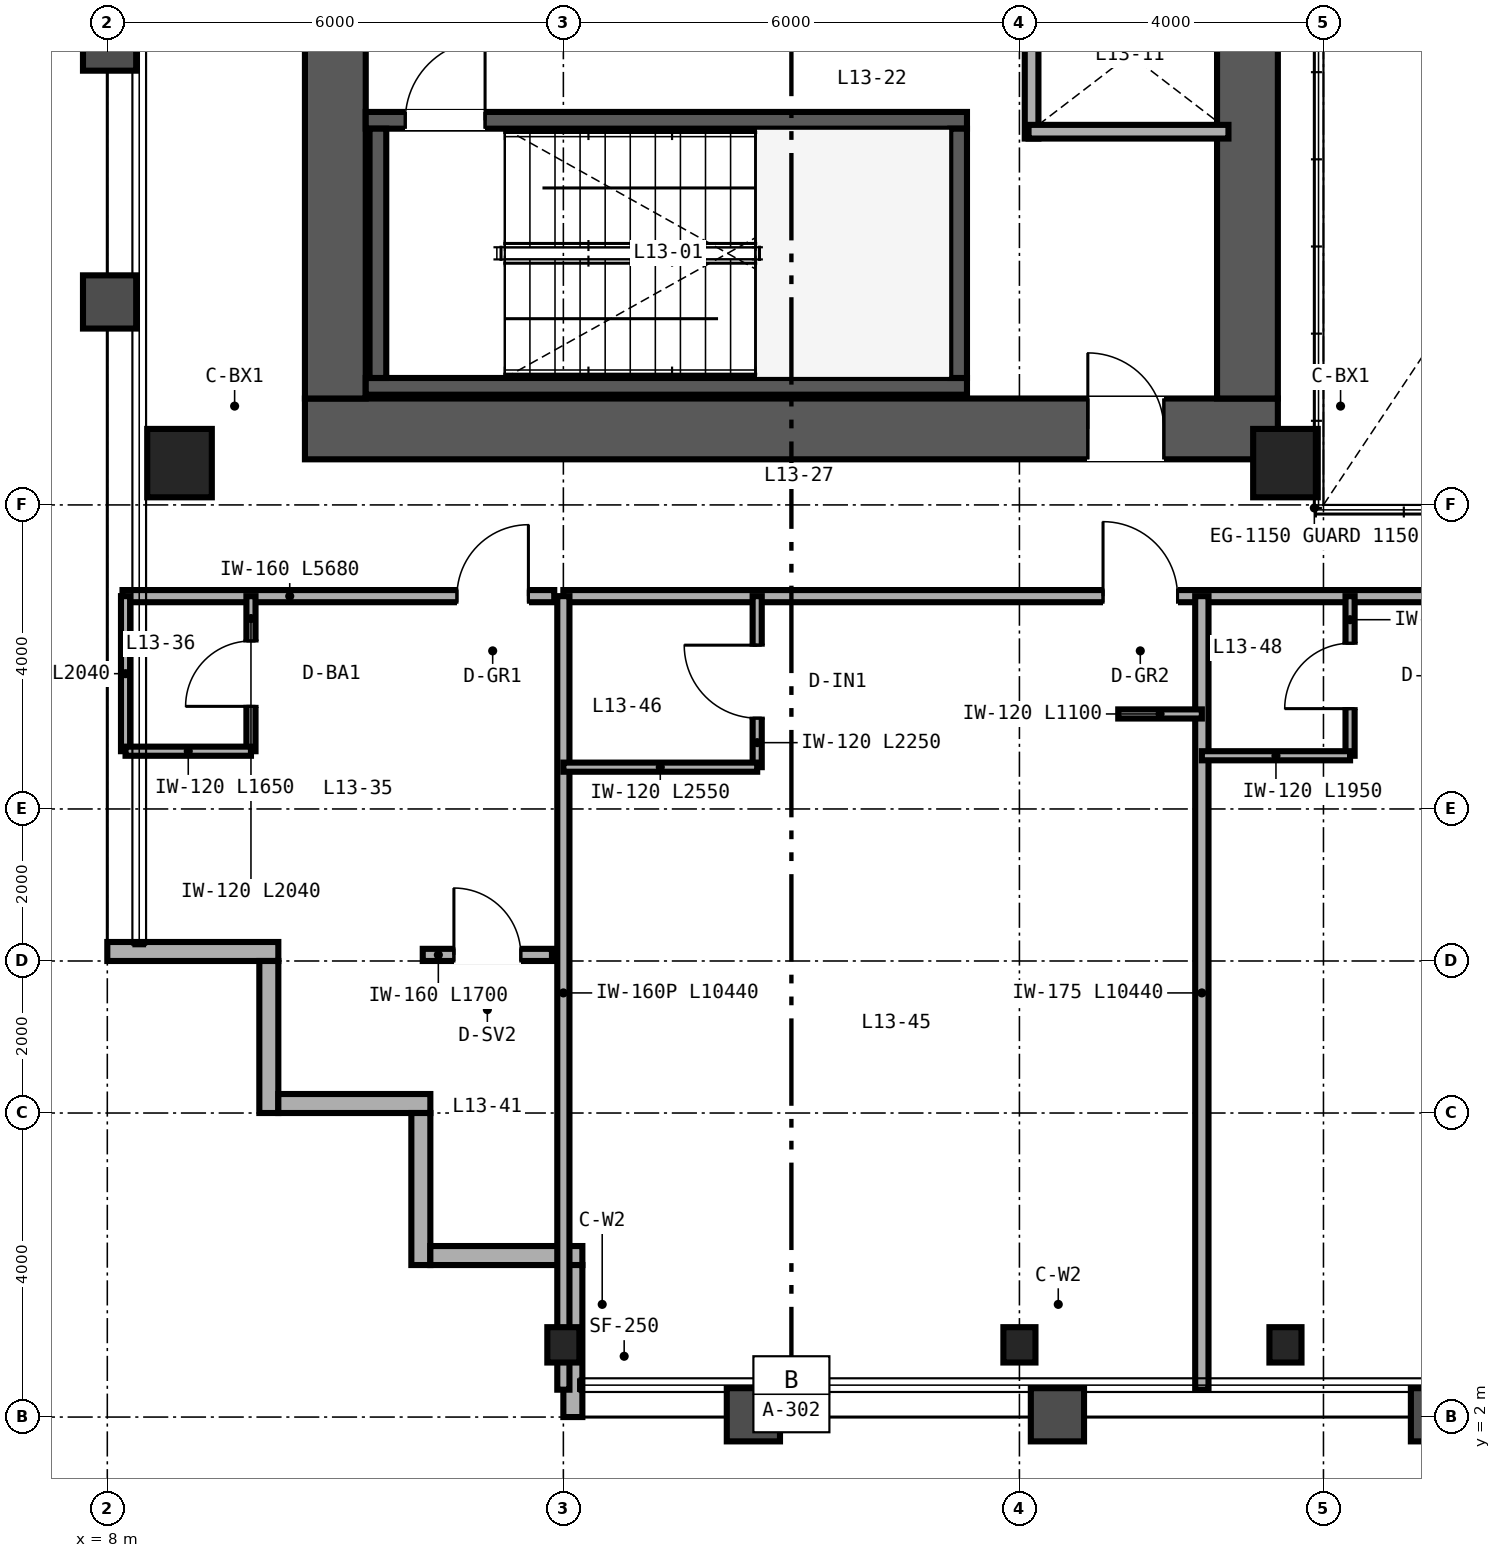
"""IFC4 building model, lengths in metres.
Left out: names, types, materials, properties, quantities, classifications, styles, units other than length and angle.
Written with IfcOpenShell. Run it as: python <this file> out.ifc"""

import sys

from ifc_helpers import new_model, si_unit, direction, frame, frame_2d, origin, origin_2d, place, context, subcontext, project, spatial, rectangle, hollow_rectangle, i_section, extrude, source, transform, mapped, element, fill, save


model = new_model("IFC4")
c1 = context("Model", 3, precision=1e-05, world=origin(), true_north=direction((0.0, 1.0)))
c2 = subcontext(c1, "Body", "Model", "MODEL_VIEW")
j1 = project(units=[si_unit("LENGTHUNIT", "METRE"), si_unit("PLANEANGLEUNIT", "RADIAN")], contexts=[c1])
p1 = place(None, origin())
s1 = spatial("IfcSite", under=j1, at=p1, CompositionType="ELEMENT")
p2 = place(p1, origin())
s2 = spatial("IfcBuilding", under=s1, at=p2, CompositionType="ELEMENT")
p3 = place(p2, frame((0.0, 0.0, 56.4)))
s3 = spatial("IfcBuildingStorey", under=s2, at=p3, CompositionType="ELEMENT", Elevation=56.4)
p4 = place(p3, frame((10.6, 15.0, 0.0), z_axis=(0.0, 0.0, 1.0), x_axis=(1.0, 0.0, 0.0)))
e1 = element("IfcWall", 1, at=p4, inside=s3, PredefinedType="SHEAR", context=c2, shape_type="SweptSolid", body=[
    extrude(rectangle(XDim=12.8, YDim=0.8, at=frame_2d((6.4, 0.0))), origin(), (0.0, 0.0, 1.0), 3.35),
])
p5 = place(p4, frame((10.3, 0.0, 0.0)))
e2 = element("IfcOpeningElement", 2, at=p5, cuts=e1, PredefinedType="OPENING", context=c2, shape_type="SweptSolid", body=[
    extrude(rectangle(XDim=1.0, YDim=2.15, at=frame_2d((0.5, 1.075))), frame((0.0, 0.41, 0.0), z_axis=(0.0, -1.0, 0.0), x_axis=(1.0, 0.0, 0.0)), (0.0, 0.0, 1.0), 0.82),
])
for number, where, z_axis, x_axis in (
    (3, (11.0, 15.4, 0.0), (0.0, 0.0, 1.0), (0.0, 1.0, 0.0)),
    (4, (23.0, 15.4, 0.0), (0.0, 0.0, 1.0), (0.0, 1.0, 0.0)),
):
    element("IfcWall", number, at=place(p3, frame(where, z_axis=z_axis, x_axis=x_axis)), inside=s3, PredefinedType="SHEAR", context=c2, shape_type="SweptSolid", body=[
        extrude(rectangle(XDim=21.2, YDim=0.8, at=frame_2d((10.6, 0.0))), origin(), (0.0, 0.0, 1.0), 3.35),
    ])
p6 = place(p3, frame((11.4, 15.56, 0.0), z_axis=(0.0, 0.0, 1.0), x_axis=(1.0, 0.0, 0.0)))
e5 = element("IfcWall", 5, at=p6, inside=s3, PredefinedType="SHEAR", context=c2, shape_type="SweptSolid", body=[
    extrude(rectangle(XDim=7.91, YDim=0.22, at=frame_2d((3.955, 0.0))), origin(), (0.0, 0.0, 1.0), 3.4),
])
p7 = place(p3, frame((11.4, 19.06, 0.0), z_axis=(0.0, 0.0, 1.0), x_axis=(1.0, 0.0, 0.0)))
e6 = element("IfcWall", 6, at=p7, inside=s3, PredefinedType="SHEAR", context=c2, shape_type="SweptSolid", body=[
    extrude(rectangle(XDim=7.91, YDim=0.22, at=frame_2d((3.955, 0.0))), origin(), (0.0, 0.0, 1.0), 3.4),
])
p8 = place(p7, frame((0.52, 0.0, 0.0)))
e7 = element("IfcOpeningElement", 7, at=p8, cuts=e6, PredefinedType="OPENING", context=c2, shape_type="SweptSolid", body=[
    extrude(rectangle(XDim=1.05, YDim=2.15, at=frame_2d((0.525, 1.075))), frame((0.0, 0.12, 0.0), z_axis=(0.0, -1.0, 0.0), x_axis=(1.0, 0.0, 0.0)), (0.0, 0.0, 1.0), 0.24),
])
for number, where, z_axis, x_axis in (
    (8, (11.56, 15.67, 0.0), (0.0, 0.0, 1.0), (0.0, 1.0, 0.0)),
    (9, (19.2, 15.67, 0.0), (0.0, 0.0, 1.0), (0.0, 1.0, 0.0)),
):
    element("IfcWall", number, at=place(p3, frame(where, z_axis=z_axis, x_axis=x_axis)), inside=s3, PredefinedType="SHEAR", context=c2, shape_type="SweptSolid", body=[
        extrude(rectangle(XDim=3.28, YDim=0.22, at=frame_2d((1.64, 0.0))), origin(), (0.0, 0.0, 1.0), 3.4),
    ])
m1 = source(origin(), c2, "Body", "SweptSolid", [
    extrude(hollow_rectangle(XDim=0.85, YDim=0.9, WallThickness=0.04, at=origin_2d()), origin(), (0.0, 0.0, 1.0), 3.35),
])
for number, where, z_axis, x_axis in (
    (10, (8.95, 14.55, 0.0), (0.0, 0.0, 1.0), (1.0, 0.0, 0.0)),
    (11, (23.5, 14.55, 0.0), (0.0, 0.0, 1.0), (1.0, 0.0, 0.0)),
):
    element("IfcColumn", number, at=place(p3, frame(where, z_axis=z_axis, x_axis=x_axis)), inside=s3, PredefinedType="COLUMN", context=c2, shape_type="MappedRepresentation", body=[
        mapped(m1, transform((0.0, 0.0, 0.0), scale=1.0)),
    ])
m2 = source(origin(), c2, "Body", "SweptSolid", [
    extrude(i_section(OverallWidth=0.422, OverallDepth=0.465, WebThickness=0.045, FlangeThickness=0.073, FilletRadius=0.025, at=origin_2d()), origin(), (0.0, 0.0, 1.0), 3.35),
])
for number, where, z_axis, x_axis in (
    (12, (14.0, 2.95, 0.0), (0.0, 0.0, 1.0), (1.0, 0.0, 0.0)),
    (13, (20.0, 2.95, 0.0), (0.0, 0.0, 1.0), (1.0, 0.0, 0.0)),
    (14, (23.5, 2.95, 0.0), (0.0, 0.0, 1.0), (1.0, 0.0, 0.0)),
):
    element("IfcColumn", number, at=place(p3, frame(where, z_axis=z_axis, x_axis=x_axis)), inside=s3, PredefinedType="COLUMN", context=c2, shape_type="MappedRepresentation", body=[
        mapped(m2, transform((0.0, 0.0, 0.0), scale=1.0)),
    ])
p9 = place(p3, frame((8.0, 8.125, 0.0), z_axis=(0.0, 0.0, 1.0), x_axis=(1.0, 0.0, 0.0)))
e15 = element("IfcWall", 15, at=p9, inside=s3, PredefinedType="SOLIDWALL", context=c2, shape_type="SweptSolid", body=[
    extrude(rectangle(XDim=2.25, YDim=0.25, at=frame_2d((1.125, 0.0))), origin(), (0.0, 0.0, 1.0), 3.35),
])
for number, where, z_axis, x_axis in (
    (16, (10.125, 8.0, 0.0), (0.0, 0.0, 1.0), (0.0, -1.0, 0.0)),
    (17, (10.25, 6.125, 0.0), (0.0, 0.0, 1.0), (1.0, 0.0, 0.0)),
    (18, (12.125, 6.0, 0.0), (0.0, 0.0, 1.0), (0.0, -1.0, 0.0)),
    (19, (12.25, 4.125, 0.0), (0.0, 0.0, 1.0), (1.0, 0.0, 0.0)),
):
    element("IfcWall", number, at=place(p3, frame(where, z_axis=z_axis, x_axis=x_axis)), inside=s3, PredefinedType="SOLIDWALL", context=c2, shape_type="SweptSolid", body=[
        extrude(rectangle(XDim=2.0, YDim=0.25, at=frame_2d((1.0, 0.0))), origin(), (0.0, 0.0, 1.0), 3.35),
    ])
p10 = place(p3, frame((14.125, 4.0, 0.0), z_axis=(0.0, 0.0, 1.0), x_axis=(0.0, -1.0, 0.0)))
e20 = element("IfcWall", 20, at=p10, inside=s3, PredefinedType="SOLIDWALL", context=c2, shape_type="SweptSolid", body=[
    extrude(rectangle(XDim=2.0, YDim=0.25, at=frame_2d((1.0, 0.0))), origin(), (0.0, 0.0, 1.0), 2.657),
])
p11 = place(p3, frame((20.16, 18.82, 0.0), z_axis=(0.0, 0.0, 1.0), x_axis=(0.0, 1.0, 0.0)))
e21 = element("IfcWall", 21, at=p11, inside=s3, PredefinedType="SOLIDWALL", context=c2, shape_type="SweptSolid", body=[
    extrude(rectangle(XDim=6.32, YDim=0.18, at=frame_2d((3.16, 0.0))), origin(), (0.0, 0.0, 1.0), 2.36),
])
p12 = place(p3, frame((20.12, 18.91, 0.0), z_axis=(0.0, 0.0, 1.0), x_axis=(1.0, 0.0, 0.0)))
e22 = element("IfcWall", 22, at=p12, inside=s3, PredefinedType="SOLIDWALL", context=c2, shape_type="SweptSolid", body=[
    extrude(rectangle(XDim=2.63, YDim=0.18, at=frame_2d((1.315, 0.0))), origin(), (0.0, 0.0, 1.0), 3.35),
])
p13 = place(p3, frame((8.2, 12.8, 0.0), z_axis=(0.0, 0.0, 1.0), x_axis=(1.0, 0.0, 0.0)))
e23 = element("IfcWall", 23, at=p13, inside=s3, PredefinedType="PARTITIONING", context=c2, shape_type="SweptSolid", body=[
    extrude(rectangle(XDim=5.68, YDim=0.16, at=frame_2d((2.84, 0.0))), origin(), (0.0, 0.0, 1.0), 3.35),
])
p14 = place(p13, frame((4.4, 0.0, 0.0)))
e24 = element("IfcOpeningElement", 24, at=p14, cuts=e23, PredefinedType="OPENING", context=c2, shape_type="SweptSolid", body=[
    extrude(rectangle(XDim=0.94, YDim=2.15, at=frame_2d((0.47, 1.075))), frame((0.0, 0.09, 0.0), z_axis=(0.0, -1.0, 0.0), x_axis=(1.0, 0.0, 0.0)), (0.0, 0.0, 1.0), 0.18),
])
p15 = place(p3, frame((9.89, 10.76, 0.0), z_axis=(0.0, 0.0, 1.0), x_axis=(0.0, 1.0, 0.0)))
e25 = element("IfcWall", 25, at=p15, inside=s3, PredefinedType="PARTITIONING", context=c2, shape_type="SweptSolid", body=[
    extrude(rectangle(XDim=2.04, YDim=0.12, at=frame_2d((1.02, 0.0))), origin(), (0.0, 0.0, 1.0), 3.35),
])
p16 = place(p15, frame((0.59, 0.0, 0.0)))
e26 = element("IfcOpeningElement", 26, at=p16, cuts=e25, PredefinedType="OPENING", context=c2, shape_type="SweptSolid", body=[
    extrude(rectangle(XDim=0.86, YDim=2.1, at=frame_2d((0.43, 1.05))), frame((0.0, 0.07, 0.0), z_axis=(0.0, -1.0, 0.0), x_axis=(1.0, 0.0, 0.0)), (0.0, 0.0, 1.0), 0.14),
])
p17 = place(p3, frame((8.24, 10.76, 0.0), z_axis=(0.0, 0.0, 1.0), x_axis=(0.0, 1.0, 0.0)))
e27 = element("IfcWall", 27, at=p17, inside=s3, PredefinedType="PARTITIONING", context=c2, shape_type="SweptSolid", body=[
    extrude(rectangle(XDim=2.04, YDim=0.12, at=frame_2d((1.02, 0.0))), origin(), (0.0, 0.0, 1.0), 3.35),
])
p18 = place(p3, frame((8.24, 10.76, 0.0), z_axis=(0.0, 0.0, 1.0), x_axis=(1.0, 0.0, 0.0)))
e28 = element("IfcWall", 28, at=p18, inside=s3, PredefinedType="PARTITIONING", context=c2, shape_type="SweptSolid", body=[
    extrude(rectangle(XDim=1.65, YDim=0.12, at=frame_2d((0.825, 0.0))), origin(), (0.0, 0.0, 1.0), 3.35),
])
p19 = place(p3, frame((12.15, 8.08, 0.0), z_axis=(0.0, 0.0, 1.0), x_axis=(1.0, 0.0, 0.0)))
e29 = element("IfcWall", 29, at=p19, inside=s3, PredefinedType="PARTITIONING", context=c2, shape_type="SweptSolid", body=[
    extrude(rectangle(XDim=1.7, YDim=0.16, at=frame_2d((0.85, 0.0))), origin(), (0.0, 0.0, 1.0), 3.35),
])
p20 = place(p19, frame((0.41, 0.0, 0.0)))
e30 = element("IfcOpeningElement", 30, at=p20, cuts=e29, PredefinedType="OPENING", context=c2, shape_type="SweptSolid", body=[
    extrude(rectangle(XDim=0.88, YDim=2.15, at=frame_2d((0.44, 1.075))), frame((0.0, 0.09, 0.0), z_axis=(0.0, -1.0, 0.0), x_axis=(1.0, 0.0, 0.0)), (0.0, 0.0, 1.0), 0.18),
])
p21 = place(p3, frame((14.0, 12.8, 0.0), z_axis=(0.0, 0.0, 1.0), x_axis=(1.0, 0.0, 0.0)))
e31 = element("IfcWall", 31, at=p21, inside=s3, PredefinedType="PARTITIONING", context=c2, shape_type="SweptSolid", body=[
    extrude(rectangle(XDim=36.0, YDim=0.16, at=frame_2d((18.0, 0.0))), origin(), (0.0, 0.0, 1.0), 2.571),
])
p22 = place(p21, frame((7.1, 0.0, 0.0)))
e32 = element("IfcOpeningElement", 32, at=p22, cuts=e31, PredefinedType="OPENING", context=c2, shape_type="SweptSolid", body=[
    extrude(rectangle(XDim=0.98, YDim=2.2, at=frame_2d((0.49, 1.1))), frame((0.0, 0.09, 0.0), z_axis=(0.0, -1.0, 0.0), x_axis=(1.0, 0.0, 0.0)), (0.0, 0.0, 1.0), 0.18),
])
p23 = place(p21, frame((15.5, 0.0, 0.0)))
e33 = element("IfcOpeningElement", 33, at=p23, cuts=e31, PredefinedType="OPENING", context=c2, shape_type="SweptSolid", body=[
    extrude(rectangle(XDim=0.98, YDim=2.2, at=frame_2d((0.49, 1.1))), frame((0.0, 0.09, 0.0), z_axis=(0.0, -1.0, 0.0), x_axis=(1.0, 0.0, 0.0)), (0.0, 0.0, 1.0), 0.18),
])
p24 = place(p21, frame((23.9, 0.0, 0.0)))
e34 = element("IfcOpeningElement", 34, at=p24, cuts=e31, PredefinedType="OPENING", context=c2, shape_type="SweptSolid", body=[
    extrude(rectangle(XDim=0.98, YDim=2.2, at=frame_2d((0.49, 1.1))), frame((0.0, 0.09, 0.0), z_axis=(0.0, -1.0, 0.0), x_axis=(1.0, 0.0, 0.0)), (0.0, 0.0, 1.0), 0.18),
])
p25 = place(p21, frame((29.34, 0.0, 0.0)))
e35 = element("IfcOpeningElement", 35, at=p25, cuts=e31, PredefinedType="OPENING", context=c2, shape_type="SweptSolid", body=[
    extrude(rectangle(XDim=0.94, YDim=2.15, at=frame_2d((0.47, 1.075))), frame((0.0, 0.09, 0.0), z_axis=(0.0, -1.0, 0.0), x_axis=(1.0, 0.0, 0.0)), (0.0, 0.0, 1.0), 0.18),
])
p26 = place(p21, frame((34.74, 0.0, 0.0)))
e36 = element("IfcOpeningElement", 36, at=p26, cuts=e31, PredefinedType="OPENING", context=c2, shape_type="SweptSolid", body=[
    extrude(rectangle(XDim=0.94, YDim=2.15, at=frame_2d((0.47, 1.075))), frame((0.0, 0.09, 0.0), z_axis=(0.0, -1.0, 0.0), x_axis=(1.0, 0.0, 0.0)), (0.0, 0.0, 1.0), 0.18),
])
p27 = place(p3, frame((14.0, 2.36, 0.0), z_axis=(0.0, 0.0, 1.0), x_axis=(0.0, 1.0, 0.0)))
e37 = element("IfcWall", 37, at=p27, inside=s3, PredefinedType="PARTITIONING", context=c2, shape_type="SweptSolid", body=[
    extrude(rectangle(XDim=10.44, YDim=0.16, at=frame_2d((5.22, 0.0))), origin(), (0.0, 0.0, 1.0), 2.657),
])
p28 = place(p3, frame((22.4, 2.36, 0.0), z_axis=(0.0, 0.0, 1.0), x_axis=(0.0, 1.0, 0.0)))
e38 = element("IfcWall", 38, at=p28, inside=s3, PredefinedType="PARTITIONING", context=c2, shape_type="SweptSolid", body=[
    extrude(rectangle(XDim=10.44, YDim=0.175, at=frame_2d((5.22, 0.0))), origin(), (0.0, 0.0, 1.0), 2.813),
])
p29 = place(p3, frame((16.55, 10.55, 0.0), z_axis=(0.0, 0.0, 1.0), x_axis=(0.0, 1.0, 0.0)))
e39 = element("IfcWall", 39, at=p29, inside=s3, PredefinedType="PARTITIONING", context=c2, shape_type="SweptSolid", body=[
    extrude(rectangle(XDim=2.25, YDim=0.12, at=frame_2d((1.125, 0.0))), origin(), (0.0, 0.0, 1.0), 3.35),
])
p30 = place(p29, frame((0.645, 0.0, 0.0)))
e40 = element("IfcOpeningElement", 40, at=p30, cuts=e39, PredefinedType="OPENING", context=c2, shape_type="SweptSolid", body=[
    extrude(rectangle(XDim=0.96, YDim=2.15, at=frame_2d((0.48, 1.075))), frame((0.0, 0.07, 0.0), z_axis=(0.0, -1.0, 0.0), x_axis=(1.0, 0.0, 0.0)), (0.0, 0.0, 1.0), 0.14),
])
p31 = place(p3, frame((14.0, 10.55, 0.0), z_axis=(0.0, 0.0, 1.0), x_axis=(1.0, 0.0, 0.0)))
e41 = element("IfcWall", 41, at=p31, inside=s3, PredefinedType="PARTITIONING", context=c2, shape_type="SweptSolid", body=[
    extrude(rectangle(XDim=2.55, YDim=0.12, at=frame_2d((1.275, 0.0))), origin(), (0.0, 0.0, 1.0), 3.35),
])
p32 = place(p3, frame((21.3, 11.25, 0.0), z_axis=(0.0, 0.0, 1.0), x_axis=(1.0, 0.0, 0.0)))
e42 = element("IfcWall", 42, at=p32, inside=s3, PredefinedType="PARTITIONING", context=c2, shape_type="SweptSolid", body=[
    extrude(rectangle(XDim=1.1, YDim=0.12, at=frame_2d((0.55, 0.0))), origin(), (0.0, 0.0, 1.0), 3.35),
])
p33 = place(p3, frame((24.35, 10.7, 0.0), z_axis=(0.0, 0.0, 1.0), x_axis=(0.0, 1.0, 0.0)))
e43 = element("IfcWall", 43, at=p33, inside=s3, PredefinedType="PARTITIONING", context=c2, shape_type="SweptSolid", body=[
    extrude(rectangle(XDim=2.1, YDim=0.12, at=frame_2d((1.05, 0.0))), origin(), (0.0, 0.0, 1.0), 3.35),
])
p34 = place(p33, frame((0.62, 0.0, 0.0)))
e44 = element("IfcOpeningElement", 44, at=p34, cuts=e43, PredefinedType="OPENING", context=c2, shape_type="SweptSolid", body=[
    extrude(rectangle(XDim=0.86, YDim=2.1, at=frame_2d((0.43, 1.05))), frame((0.0, 0.07, 0.0), z_axis=(0.0, -1.0, 0.0), x_axis=(1.0, 0.0, 0.0)), (0.0, 0.0, 1.0), 0.14),
])
p35 = place(p3, frame((22.4, 10.7, 0.0), z_axis=(0.0, 0.0, 1.0), x_axis=(1.0, 0.0, 0.0)))
e45 = element("IfcWall", 45, at=p35, inside=s3, PredefinedType="PARTITIONING", context=c2, shape_type="SweptSolid", body=[
    extrude(rectangle(XDim=1.95, YDim=0.12, at=frame_2d((0.975, 0.0))), origin(), (0.0, 0.0, 1.0), 2.571),
])
m3 = source(origin(), c2, "Body", "SweptSolid", [
    extrude(rectangle(XDim=1.05, YDim=2.15, at=frame_2d((0.525, 1.075))), frame((0.0, 0.025, 0.0), z_axis=(0.0, -1.0, 0.0), x_axis=(1.0, 0.0, 0.0)), (0.0, 0.0, 1.0), 0.05),
])
p36 = place(p8, origin())
e46 = element("IfcDoor", 46, at=p36, inside=s3, OperationType="SINGLE_SWING_RIGHT", PredefinedType="DOOR", context=c2, shape_type="MappedRepresentation", body=[
    mapped(m3, transform((0.0, 0.0, 0.0), scale=1.0)),
])
fill(e7, e46)
m4 = source(origin(), c2, "Body", "SweptSolid", [
    extrude(rectangle(XDim=1.0, YDim=2.15, at=frame_2d((0.5, 1.075))), frame((0.0, 0.025, 0.0), z_axis=(0.0, -1.0, 0.0), x_axis=(1.0, 0.0, 0.0)), (0.0, 0.0, 1.0), 0.05),
])
p37 = place(p5, origin())
e47 = element("IfcDoor", 47, at=p37, inside=s3, OperationType="SINGLE_SWING_LEFT", PredefinedType="DOOR", context=c2, shape_type="MappedRepresentation", body=[
    mapped(m4, transform((0.0, 0.0, 0.0), scale=1.0)),
])
fill(e2, e47)
m5 = source(origin(), c2, "Body", "SweptSolid", [
    extrude(rectangle(XDim=0.86, YDim=2.1, at=frame_2d((0.43, 1.05))), frame((0.0, 0.025, 0.0), z_axis=(0.0, -1.0, 0.0), x_axis=(1.0, 0.0, 0.0)), (0.0, 0.0, 1.0), 0.05),
])
p38 = place(p16, origin())
e48 = element("IfcDoor", 48, at=p38, inside=s3, OperationType="SINGLE_SWING_LEFT", PredefinedType="DOOR", context=c2, shape_type="MappedRepresentation", body=[
    mapped(m5, transform((0.0, 0.0, 0.0), scale=1.0)),
])
fill(e26, e48)
m6 = source(origin(), c2, "Body", "SweptSolid", [
    extrude(rectangle(XDim=0.94, YDim=2.15, at=frame_2d((0.47, 1.075))), frame((0.0, 0.025, 0.0), z_axis=(0.0, -1.0, 0.0), x_axis=(1.0, 0.0, 0.0)), (0.0, 0.0, 1.0), 0.05),
])
p39 = place(p14, origin())
e49 = element("IfcDoor", 49, at=p39, inside=s3, OperationType="SINGLE_SWING_RIGHT", PredefinedType="DOOR", context=c2, shape_type="MappedRepresentation", body=[
    mapped(m6, transform((0.0, 0.0, 0.0), scale=1.0)),
])
fill(e24, e49)
m7 = source(origin(), c2, "Body", "SweptSolid", [
    extrude(rectangle(XDim=0.88, YDim=2.15, at=frame_2d((0.44, 1.075))), frame((0.0, 0.025, 0.0), z_axis=(0.0, -1.0, 0.0), x_axis=(1.0, 0.0, 0.0)), (0.0, 0.0, 1.0), 0.05),
])
p40 = place(p20, origin())
e50 = element("IfcDoor", 50, at=p40, inside=s3, OperationType="SINGLE_SWING_LEFT", PredefinedType="DOOR", context=c2, shape_type="MappedRepresentation", body=[
    mapped(m7, transform((0.0, 0.0, 0.0), scale=1.0)),
])
fill(e30, e50)
m8 = source(origin(), c2, "Body", "SweptSolid", [
    extrude(rectangle(XDim=0.96, YDim=2.15, at=frame_2d((0.48, 1.075))), frame((0.0, 0.025, 0.0), z_axis=(0.0, -1.0, 0.0), x_axis=(1.0, 0.0, 0.0)), (0.0, 0.0, 1.0), 0.05),
])
p41 = place(p30, origin())
e51 = element("IfcDoor", 51, at=p41, inside=s3, OperationType="SINGLE_SWING_RIGHT", PredefinedType="DOOR", context=c2, shape_type="MappedRepresentation", body=[
    mapped(m8, transform((0.0, 0.0, 0.0), scale=1.0)),
])
fill(e40, e51)
p42 = place(p34, origin())
e52 = element("IfcDoor", 52, at=p42, inside=s3, OperationType="SINGLE_SWING_LEFT", PredefinedType="DOOR", context=c2, shape_type="MappedRepresentation", body=[
    mapped(m5, transform((0.0, 0.0, 0.0), scale=1.0)),
])
fill(e44, e52)
m9 = source(origin(), c2, "Body", "SweptSolid", [
    extrude(rectangle(XDim=0.98, YDim=2.2, at=frame_2d((0.49, 1.1))), frame((0.0, 0.025, 0.0), z_axis=(0.0, -1.0, 0.0), x_axis=(1.0, 0.0, 0.0)), (0.0, 0.0, 1.0), 0.05),
])
p43 = place(p22, origin())
e53 = element("IfcDoor", 53, at=p43, inside=s3, OperationType="SINGLE_SWING_LEFT", PredefinedType="DOOR", context=c2, shape_type="MappedRepresentation", body=[
    mapped(m9, transform((0.0, 0.0, 0.0), scale=1.0)),
])
fill(e32, e53)
save(model, sys.argv[1])
